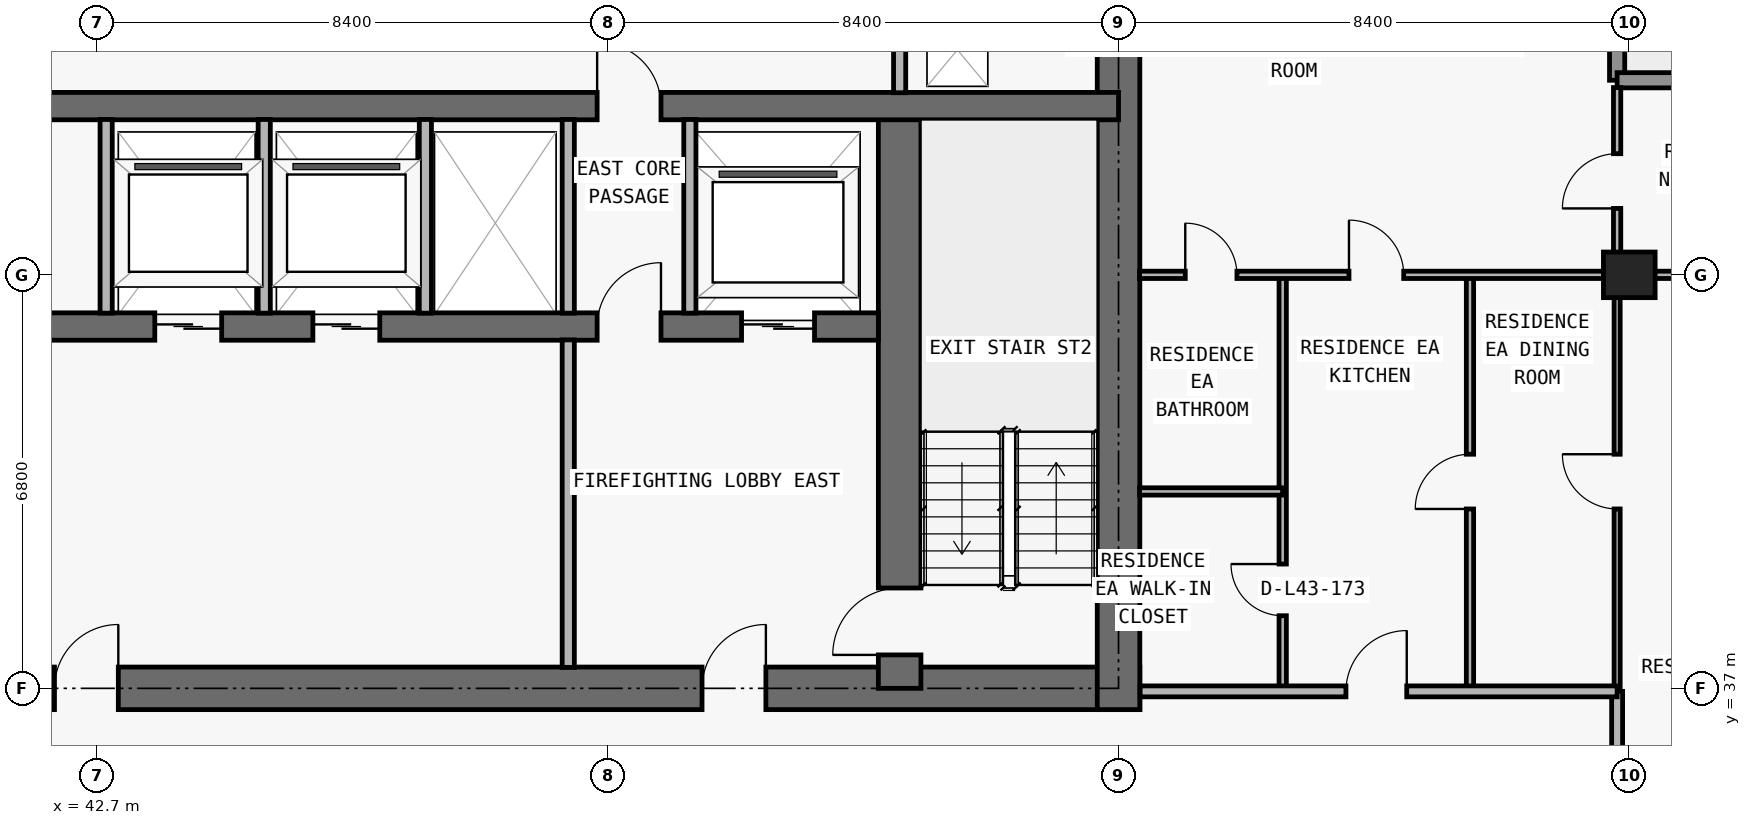
"""IFC4 building model, lengths in metres.
Left out: names, types, materials, properties, quantities, classifications, styles, units other than length and angle.
Written with IfcOpenShell. Run it as: python <this file> out.ifc"""

import sys

from ifc_helpers import new_model, si_unit, direction, frame, frame_2d, origin, origin_2d, place, context, subcontext, project, spatial, rectangle, extrude, element, fill, save


model = new_model("IFC4")
c1 = context("Model", 3, precision=1e-05, world=origin(), true_north=direction((0.0, 1.0)))
c2 = subcontext(c1, "Body", "Model", "MODEL_VIEW")
j1 = project(units=[si_unit("LENGTHUNIT", "METRE"), si_unit("PLANEANGLEUNIT", "RADIAN")], contexts=[c1])
p1 = place(None, origin())
s1 = spatial("IfcSite", under=j1, at=p1, CompositionType="ELEMENT")
p2 = place(p1, origin())
s2 = spatial("IfcBuilding", under=s1, at=p2, CompositionType="ELEMENT")
p3 = place(p2, frame((0.0, 0.0, 157.2)))
s3 = spatial("IfcBuildingStorey", under=s2, at=p3, CompositionType="ELEMENT", Elevation=157.2)
p4 = place(p3, frame((67.9, 43.8, 0.0), z_axis=(0.0, 0.0, 1.0), x_axis=(1.0, 0.0, 0.0)))
e1 = element("IfcColumn", 1, at=p4, inside=s3, PredefinedType="COLUMN", context=c2, shape_type="SweptSolid", body=[
    extrude(rectangle(XDim=0.85, YDim=0.75, at=origin_2d()), origin(), (0.0, 0.0, 1.0), 3.05),
])
p5 = place(p3, frame((17.95, 37.0, 0.0), z_axis=(0.0, 0.0, 1.0), x_axis=(1.0, 0.0, 0.0)))
e2 = element("IfcWall", 2, at=p5, inside=s3, PredefinedType="SHEAR", context=c2, shape_type="SweptSolid", body=[
    extrude(rectangle(XDim=41.9, YDim=0.7, at=frame_2d((20.95, 0.0))), origin(), (0.0, 0.0, 1.0), 3.05),
])
p6 = place(p5, frame((14.35, 0.0, 0.0)))
e3 = element("IfcOpeningElement", 3, at=p6, cuts=e2, PredefinedType="OPENING", context=c2, shape_type="SweptSolid", body=[
    extrude(rectangle(XDim=1.1, YDim=2.15, at=frame_2d((0.55, 1.075))), frame((0.0, 0.36, 0.0), z_axis=(0.0, -1.0, 0.0), x_axis=(1.0, 0.0, 0.0)), (0.0, 0.0, 1.0), 0.72),
])
p7 = place(p5, frame((6.2, 0.0, 0.0)))
e4 = element("IfcOpeningElement", 4, at=p7, cuts=e2, PredefinedType="OPENING", context=c2, shape_type="SweptSolid", body=[
    extrude(rectangle(XDim=1.05, YDim=2.15, at=frame_2d((0.525, 1.075))), frame((0.0, 0.36, 0.0), z_axis=(0.0, -1.0, 0.0), x_axis=(1.0, 0.0, 0.0)), (0.0, 0.0, 1.0), 0.72),
])
p8 = place(p5, frame((34.7, 0.0, 0.0)))
e5 = element("IfcOpeningElement", 5, at=p8, cuts=e2, PredefinedType="OPENING", context=c2, shape_type="SweptSolid", body=[
    extrude(rectangle(XDim=1.05, YDim=2.15, at=frame_2d((0.525, 1.075))), frame((0.0, 0.36, 0.0), z_axis=(0.0, -1.0, 0.0), x_axis=(1.0, 0.0, 0.0)), (0.0, 0.0, 1.0), 0.72),
])
p9 = place(p5, frame((10.812, 0.0, 0.0)))
e6 = element("IfcOpeningElement", 6, at=p9, cuts=e2, PredefinedType="OPENING", context=c2, shape_type="SweptSolid", body=[
    extrude(rectangle(XDim=1.05, YDim=2.15, at=frame_2d((0.525, 1.075))), frame((0.0, 0.36, 0.0), z_axis=(0.0, -1.0, 0.0), x_axis=(1.0, 0.0, 0.0)), (0.0, 0.0, 1.0), 0.72),
])
p10 = place(p5, frame((24.05, 0.0, 0.0)))
e7 = element("IfcOpeningElement", 7, at=p10, cuts=e2, PredefinedType="OPENING", context=c2, shape_type="SweptSolid", body=[
    extrude(rectangle(XDim=1.05, YDim=2.15, at=frame_2d((0.525, 1.075))), frame((0.0, 0.36, 0.0), z_axis=(0.0, -1.0, 0.0), x_axis=(1.0, 0.0, 0.0)), (0.0, 0.0, 1.0), 0.72),
])
p11 = place(p3, frame((59.5, 36.65, 0.0), z_axis=(0.0, 0.0, 1.0), x_axis=(0.0, 1.0, 0.0)))
e8 = element("IfcWall", 8, at=p11, inside=s3, PredefinedType="SHEAR", context=c2, shape_type="SweptSolid", body=[
    extrude(rectangle(XDim=13.95, YDim=0.7, at=frame_2d((6.975, 0.0))), origin(), (0.0, 0.0, 1.0), 3.05),
])
p12 = place(p3, frame((55.9, 37.0, 0.0), z_axis=(0.0, 0.0, 1.0), x_axis=(0.0, 1.0, 0.0)))
e9 = element("IfcWall", 9, at=p12, inside=s3, PredefinedType="SHEAR", context=c2, shape_type="SweptSolid", body=[
    extrude(rectangle(XDim=9.575, YDim=0.7, at=frame_2d((4.788, 0.0))), origin(), (0.0, 0.0, 1.0), 3.05),
])
p13 = place(p12, frame((0.55, 0.0, 0.0)))
e10 = element("IfcOpeningElement", 10, at=p13, cuts=e9, PredefinedType="OPENING", context=c2, shape_type="SweptSolid", body=[
    extrude(rectangle(XDim=1.1, YDim=2.15, at=frame_2d((0.55, 1.075))), frame((0.0, 0.36, 0.0), z_axis=(0.0, -1.0, 0.0), x_axis=(1.0, 0.0, 0.0)), (0.0, 0.0, 1.0), 0.72),
])
p14 = place(p3, frame((22.25, 42.95, 0.0), z_axis=(0.0, 0.0, 1.0), x_axis=(1.0, 0.0, 0.0)))
e11 = element("IfcWall", 11, at=p14, inside=s3, PredefinedType="SHEAR", context=c2, shape_type="SweptSolid", body=[
    extrude(rectangle(XDim=33.3, YDim=0.45, at=frame_2d((16.65, 0.0))), origin(), (0.0, 0.0, 1.0), 3.05),
])
p15 = place(p14, frame((1.05, 0.0, 0.0)))
e12 = element("IfcOpeningElement", 12, at=p15, cuts=e11, PredefinedType="OPENING", context=c2, shape_type="SweptSolid", body=[
    extrude(rectangle(XDim=1.2, YDim=2.2, at=frame_2d((0.6, 1.1))), frame((0.0, 0.235, 0.0), z_axis=(0.0, -1.0, 0.0), x_axis=(1.0, 0.0, 0.0)), (0.0, 0.0, 1.0), 0.47),
])
p16 = place(p14, frame((31.05, 0.0, 0.0)))
e13 = element("IfcOpeningElement", 13, at=p16, cuts=e11, PredefinedType="OPENING", context=c2, shape_type="SweptSolid", body=[
    extrude(rectangle(XDim=1.2, YDim=2.2, at=frame_2d((0.6, 1.1))), frame((0.0, 0.235, 0.0), z_axis=(0.0, -1.0, 0.0), x_axis=(1.0, 0.0, 0.0)), (0.0, 0.0, 1.0), 0.47),
])
p17 = place(p14, frame((21.4, 0.0, 0.0)))
e14 = element("IfcOpeningElement", 14, at=p17, cuts=e11, PredefinedType="OPENING", context=c2, shape_type="SweptSolid", body=[
    extrude(rectangle(XDim=1.1, YDim=2.2, at=frame_2d((0.55, 1.1))), frame((0.0, 0.235, 0.0), z_axis=(0.0, -1.0, 0.0), x_axis=(1.0, 0.0, 0.0)), (0.0, 0.0, 1.0), 0.47),
])
p18 = place(p14, frame((24.0, 0.0, 0.0)))
e15 = element("IfcOpeningElement", 15, at=p18, cuts=e11, PredefinedType="OPENING", context=c2, shape_type="SweptSolid", body=[
    extrude(rectangle(XDim=1.1, YDim=2.2, at=frame_2d((0.55, 1.1))), frame((0.0, 0.235, 0.0), z_axis=(0.0, -1.0, 0.0), x_axis=(1.0, 0.0, 0.0)), (0.0, 0.0, 1.0), 0.47),
])
p19 = place(p14, frame((3.625, 0.0, 0.0)))
e16 = element("IfcOpeningElement", 16, at=p19, cuts=e11, PredefinedType="OPENING", context=c2, shape_type="SweptSolid", body=[
    extrude(rectangle(XDim=1.05, YDim=2.15, at=frame_2d((0.525, 1.075))), frame((0.0, 0.235, 0.0), z_axis=(0.0, -1.0, 0.0), x_axis=(1.0, 0.0, 0.0)), (0.0, 0.0, 1.0), 0.47),
])
p20 = place(p14, frame((28.675, 0.0, 0.0)))
e17 = element("IfcOpeningElement", 17, at=p20, cuts=e11, PredefinedType="OPENING", context=c2, shape_type="SweptSolid", body=[
    extrude(rectangle(XDim=1.05, YDim=2.15, at=frame_2d((0.525, 1.075))), frame((0.0, 0.235, 0.0), z_axis=(0.0, -1.0, 0.0), x_axis=(1.0, 0.0, 0.0)), (0.0, 0.0, 1.0), 0.47),
])
p21 = place(p14, frame((15.975, 0.0, 0.0)))
e18 = element("IfcOpeningElement", 18, at=p21, cuts=e11, PredefinedType="OPENING", context=c2, shape_type="SweptSolid", body=[
    extrude(rectangle(XDim=1.0, YDim=2.2, at=frame_2d((0.5, 1.1))), frame((0.0, 0.235, 0.0), z_axis=(0.0, -1.0, 0.0), x_axis=(1.0, 0.0, 0.0)), (0.0, 0.0, 1.0), 0.47),
])
p22 = place(p3, frame((18.3, 46.575, 0.0), z_axis=(0.0, 0.0, 1.0), x_axis=(1.0, 0.0, 0.0)))
e19 = element("IfcWall", 19, at=p22, inside=s3, PredefinedType="SHEAR", context=c2, shape_type="SweptSolid", body=[
    extrude(rectangle(XDim=41.2, YDim=0.45, at=frame_2d((20.6, 0.0))), origin(), (0.0, 0.0, 1.0), 3.05),
])
p23 = place(p22, frame((7.575, 0.0, 0.0)))
e20 = element("IfcOpeningElement", 20, at=p23, cuts=e19, PredefinedType="OPENING", context=c2, shape_type="SweptSolid", body=[
    extrude(rectangle(XDim=1.05, YDim=2.15, at=frame_2d((0.525, 1.075))), frame((0.0, 0.235, 0.0), z_axis=(0.0, -1.0, 0.0), x_axis=(1.0, 0.0, 0.0)), (0.0, 0.0, 1.0), 0.47),
])
p24 = place(p22, frame((32.625, 0.0, 0.0)))
e21 = element("IfcOpeningElement", 21, at=p24, cuts=e19, PredefinedType="OPENING", context=c2, shape_type="SweptSolid", body=[
    extrude(rectangle(XDim=1.05, YDim=2.15, at=frame_2d((0.525, 1.075))), frame((0.0, 0.235, 0.0), z_axis=(0.0, -1.0, 0.0), x_axis=(1.0, 0.0, 0.0)), (0.0, 0.0, 1.0), 0.47),
])
p25 = place(p3, frame((67.7, 50.45, 0.0), z_axis=(0.0, 0.0, 1.0), x_axis=(0.0, -1.0, 0.0)))
e22 = element("IfcWall", 22, at=p25, inside=s3, PredefinedType="ELEMENTEDWALL", context=c2, shape_type="SweptSolid", body=[
    extrude(rectangle(XDim=3.45, YDim=0.25, at=frame_2d((1.725, 0.0))), origin(), (0.0, 0.0, 1.0), 3.05),
])
p26 = place(p3, frame((67.7, 47.0, 0.0), z_axis=(0.0, 0.0, 1.0), x_axis=(1.0, 0.0, 0.0)))
e23 = element("IfcWall", 23, at=p26, inside=s3, PredefinedType="ELEMENTEDWALL", context=c2, shape_type="SweptSolid", body=[
    extrude(rectangle(XDim=3.85, YDim=0.25, at=frame_2d((1.925, 0.0))), origin(), (0.0, 0.0, 1.0), 3.05),
])
for number, where, z_axis, x_axis in (
    (24, (42.85, 43.17, 0.0), (0.0, 0.0, 1.0), (0.0, 1.0, 0.0)),
    (25, (45.45, 43.17, 0.0), (0.0, 0.0, 1.0), (0.0, 1.0, 0.0)),
    (26, (48.1, 43.17, 0.0), (0.0, 0.0, 1.0), (0.0, 1.0, 0.0)),
):
    element("IfcWall", number, at=place(p3, frame(where, z_axis=z_axis, x_axis=x_axis)), inside=s3, PredefinedType="PARTITIONING", context=c2, shape_type="SweptSolid", body=[
        extrude(rectangle(XDim=3.185, YDim=0.2, at=frame_2d((1.593, 0.0))), origin(), (0.0, 0.0, 1.0), 3.05),
    ])
p27 = place(p3, frame((50.45, 37.345, 0.0), z_axis=(0.0, 0.0, 1.0), x_axis=(0.0, 1.0, 0.0)))
e27 = element("IfcWall", 27, at=p27, inside=s3, PredefinedType="PARTITIONING", context=c2, shape_type="SweptSolid", body=[
    extrude(rectangle(XDim=5.385, YDim=0.2, at=frame_2d((2.692, 0.0))), origin(), (0.0, 0.0, 1.0), 3.05),
])
for number, where, z_axis, x_axis in (
    (28, (50.45, 43.17, 0.0), (0.0, 0.0, 1.0), (0.0, 1.0, 0.0)),
    (29, (52.45, 43.17, 0.0), (0.0, 0.0, 1.0), (0.0, 1.0, 0.0)),
):
    element("IfcWall", number, at=place(p3, frame(where, z_axis=z_axis, x_axis=x_axis)), inside=s3, PredefinedType="PARTITIONING", context=c2, shape_type="SweptSolid", body=[
        extrude(rectangle(XDim=3.185, YDim=0.2, at=frame_2d((1.593, 0.0))), origin(), (0.0, 0.0, 1.0), 3.05),
    ])
p28 = place(p3, frame((55.9, 46.795, 0.0), z_axis=(0.0, 0.0, 1.0), x_axis=(0.0, 1.0, 0.0)))
e30 = element("IfcWall", 30, at=p28, inside=s3, PredefinedType="PARTITIONING", context=c2, shape_type="SweptSolid", body=[
    extrude(rectangle(XDim=3.16, YDim=0.2, at=frame_2d((1.58, 0.0))), origin(), (0.0, 0.0, 1.0), 3.05),
])
p29 = place(p3, frame((62.2, 37.0, 0.0), z_axis=(0.0, 0.0, 1.0), x_axis=(0.0, 1.0, 0.0)))
e31 = element("IfcWall", 31, at=p29, inside=s3, PredefinedType="PARTITIONING", context=c2, shape_type="SweptSolid", body=[
    extrude(rectangle(XDim=6.8, YDim=0.12, at=frame_2d((3.4, 0.0))), origin(), (0.0, 0.0, 1.0), 3.05),
])
p30 = place(p29, frame((1.194, 0.0, 0.0)))
e32 = element("IfcOpeningElement", 32, at=p30, cuts=e31, PredefinedType="OPENING", context=c2, shape_type="SweptSolid", body=[
    extrude(rectangle(XDim=0.85, YDim=2.1, at=frame_2d((0.425, 1.05))), frame((0.0, 0.07, 0.0), z_axis=(0.0, -1.0, 0.0), x_axis=(1.0, 0.0, 0.0)), (0.0, 0.0, 1.0), 0.14),
])
p31 = place(p3, frame((65.28, 37.0, 0.0), z_axis=(0.0, 0.0, 1.0), x_axis=(0.0, 1.0, 0.0)))
e33 = element("IfcWall", 33, at=p31, inside=s3, PredefinedType="PARTITIONING", context=c2, shape_type="SweptSolid", body=[
    extrude(rectangle(XDim=6.8, YDim=0.12, at=frame_2d((3.4, 0.0))), origin(), (0.0, 0.0, 1.0), 3.05),
])
p32 = place(p31, frame((2.95, 0.0, 0.0)))
e34 = element("IfcOpeningElement", 34, at=p32, cuts=e33, PredefinedType="OPENING", context=c2, shape_type="SweptSolid", body=[
    extrude(rectangle(XDim=0.9, YDim=2.15, at=frame_2d((0.45, 1.075))), frame((0.0, 0.07, 0.0), z_axis=(0.0, -1.0, 0.0), x_axis=(1.0, 0.0, 0.0)), (0.0, 0.0, 1.0), 0.14),
])
p33 = place(p3, frame((67.7, 34.205, 0.0), z_axis=(0.0, 0.0, 1.0), x_axis=(0.0, 1.0, 0.0)))
e35 = element("IfcWall", 35, at=p33, inside=s3, PredefinedType="PARTITIONING", context=c2, shape_type="SweptSolid", body=[
    extrude(rectangle(XDim=2.745, YDim=0.18, at=frame_2d((1.373, 0.0))), origin(), (0.0, 0.0, 1.0), 2.263),
])
p34 = place(p3, frame((67.7, 37.0, 0.0), z_axis=(0.0, 0.0, 1.0), x_axis=(0.0, 1.0, 0.0)))
e36 = element("IfcWall", 36, at=p34, inside=s3, PredefinedType="MOVABLE", context=c2, shape_type="SweptSolid", body=[
    extrude(rectangle(XDim=6.8, YDim=0.1, at=frame_2d((3.4, 0.0))), origin(), (0.0, 0.0, 1.0), 2.263),
])
p35 = place(p34, frame((2.95, 0.0, 0.0)))
e37 = element("IfcOpeningElement", 37, at=p35, cuts=e36, PredefinedType="OPENING", context=c2, shape_type="SweptSolid", body=[
    extrude(rectangle(XDim=0.9, YDim=2.15, at=frame_2d((0.45, 1.075))), frame((0.0, 0.06, 0.0), z_axis=(0.0, -1.0, 0.0), x_axis=(1.0, 0.0, 0.0)), (0.0, 0.0, 1.0), 0.12),
])
p36 = place(p3, frame((67.7, 43.805, 0.0), z_axis=(0.0, 0.0, 1.0), x_axis=(0.0, 1.0, 0.0)))
e38 = element("IfcWall", 38, at=p36, inside=s3, PredefinedType="PARTITIONING", context=c2, shape_type="SweptSolid", body=[
    extrude(rectangle(XDim=3.075, YDim=0.12, at=frame_2d((1.538, 0.0))), origin(), (0.0, 0.0, 1.0), 3.05),
])
p37 = place(p36, frame((1.087, 0.0, 0.0)))
e39 = element("IfcOpeningElement", 39, at=p37, cuts=e38, PredefinedType="OPENING", context=c2, shape_type="SweptSolid", body=[
    extrude(rectangle(XDim=0.9, YDim=2.15, at=frame_2d((0.45, 1.075))), frame((0.0, 0.07, 0.0), z_axis=(0.0, -1.0, 0.0), x_axis=(1.0, 0.0, 0.0)), (0.0, 0.0, 1.0), 0.14),
])
p38 = place(p3, frame((59.855, 36.95, 0.0), z_axis=(0.0, 0.0, 1.0), x_axis=(1.0, 0.0, 0.0)))
e40 = element("IfcWall", 40, at=p38, inside=s3, PredefinedType="PARTITIONING", context=c2, shape_type="SweptSolid", body=[
    extrude(rectangle(XDim=7.845, YDim=0.18, at=frame_2d((3.922, 0.0))), origin(), (0.0, 0.0, 1.0), 3.05),
])
p39 = place(p38, frame((3.385, 0.0, 0.0)))
e41 = element("IfcOpeningElement", 41, at=p39, cuts=e40, PredefinedType="OPENING", context=c2, shape_type="SweptSolid", body=[
    extrude(rectangle(XDim=1.0, YDim=2.2, at=frame_2d((0.5, 1.1))), frame((0.0, 0.1, 0.0), z_axis=(0.0, -1.0, 0.0), x_axis=(1.0, 0.0, 0.0)), (0.0, 0.0, 1.0), 0.2),
])
p40 = place(p3, frame((59.845, 40.238, 0.0), z_axis=(0.0, 0.0, 1.0), x_axis=(1.0, 0.0, 0.0)))
e42 = element("IfcWall", 42, at=p40, inside=s3, PredefinedType="PARTITIONING", context=c2, shape_type="SweptSolid", body=[
    extrude(rectangle(XDim=2.355, YDim=0.12, at=frame_2d((1.177, 0.0))), origin(), (0.0, 0.0, 1.0), 3.05),
])
p41 = place(p3, frame((59.845, 43.8, 0.0), z_axis=(0.0, 0.0, 1.0), x_axis=(1.0, 0.0, 0.0)))
e43 = element("IfcWall", 43, at=p41, inside=s3, PredefinedType="PARTITIONING", context=c2, shape_type="SweptSolid", body=[
    extrude(rectangle(XDim=11.56, YDim=0.12, at=frame_2d((5.78, 0.0))), origin(), (0.0, 0.0, 1.0), 2.418),
])
p42 = place(p41, frame((3.445, 0.0, 0.0)))
e44 = element("IfcOpeningElement", 44, at=p42, cuts=e43, PredefinedType="OPENING", context=c2, shape_type="SweptSolid", body=[
    extrude(rectangle(XDim=0.9, YDim=2.15, at=frame_2d((0.45, 1.075))), frame((0.0, 0.07, 0.0), z_axis=(0.0, -1.0, 0.0), x_axis=(1.0, 0.0, 0.0)), (0.0, 0.0, 1.0), 0.14),
])
p43 = place(p41, frame((0.752, 0.0, 0.0)))
e45 = element("IfcOpeningElement", 45, at=p43, cuts=e43, PredefinedType="OPENING", context=c2, shape_type="SweptSolid", body=[
    extrude(rectangle(XDim=0.85, YDim=2.1, at=frame_2d((0.425, 1.05))), frame((0.0, 0.07, 0.0), z_axis=(0.0, -1.0, 0.0), x_axis=(1.0, 0.0, 0.0)), (0.0, 0.0, 1.0), 0.14),
])
p44 = place(p16, origin())
e46 = element("IfcDoor", 46, at=p44, inside=s3, OperationType="DOUBLE_DOOR_SLIDING", PredefinedType="DOOR", context=c2, shape_type="SweptSolid", body=[
    extrude(rectangle(XDim=1.2, YDim=2.2, at=frame_2d((0.6, 1.1))), frame((0.0, 0.025, 0.0), z_axis=(0.0, -1.0, 0.0), x_axis=(1.0, 0.0, 0.0)), (0.0, 0.0, 1.0), 0.05),
])
fill(e13, e46)
p45 = place(p17, origin())
e47 = element("IfcDoor", 47, at=p45, inside=s3, OperationType="DOUBLE_DOOR_SLIDING", PredefinedType="DOOR", context=c2, shape_type="SweptSolid", body=[
    extrude(rectangle(XDim=1.1, YDim=2.2, at=frame_2d((0.55, 1.1))), frame((0.0, 0.025, 0.0), z_axis=(0.0, -1.0, 0.0), x_axis=(1.0, 0.0, 0.0)), (0.0, 0.0, 1.0), 0.05),
])
fill(e14, e47)
p46 = place(p18, origin())
e48 = element("IfcDoor", 48, at=p46, inside=s3, OperationType="DOUBLE_DOOR_SLIDING", PredefinedType="DOOR", context=c2, shape_type="SweptSolid", body=[
    extrude(rectangle(XDim=1.1, YDim=2.2, at=frame_2d((0.55, 1.1))), frame((0.0, 0.025, 0.0), z_axis=(0.0, -1.0, 0.0), x_axis=(1.0, 0.0, 0.0)), (0.0, 0.0, 1.0), 0.05),
])
fill(e15, e48)
p47 = place(p8, origin())
e49 = element("IfcDoor", 49, at=p47, inside=s3, OperationType="SINGLE_SWING_RIGHT", PredefinedType="DOOR", context=c2, shape_type="SweptSolid", body=[
    extrude(rectangle(XDim=1.05, YDim=2.15, at=frame_2d((0.525, 1.075))), frame((0.0, 0.025, 0.0), z_axis=(0.0, -1.0, 0.0), x_axis=(1.0, 0.0, 0.0)), (0.0, 0.0, 1.0), 0.05),
])
fill(e5, e49)
p48 = place(p13, origin())
e50 = element("IfcDoor", 50, at=p48, inside=s3, OperationType="SINGLE_SWING_LEFT", PredefinedType="DOOR", context=c2, shape_type="SweptSolid", body=[
    extrude(rectangle(XDim=1.1, YDim=2.15, at=frame_2d((0.55, 1.075))), frame((0.0, 0.025, 0.0), z_axis=(0.0, -1.0, 0.0), x_axis=(1.0, 0.0, 0.0)), (0.0, 0.0, 1.0), 0.05),
])
fill(e10, e50)
p49 = place(p20, origin())
e51 = element("IfcDoor", 51, at=p49, inside=s3, OperationType="SINGLE_SWING_RIGHT", PredefinedType="DOOR", context=c2, shape_type="SweptSolid", body=[
    extrude(rectangle(XDim=1.05, YDim=2.15, at=frame_2d((0.525, 1.075))), frame((0.0, 0.025, 0.0), z_axis=(0.0, -1.0, 0.0), x_axis=(1.0, 0.0, 0.0)), (0.0, 0.0, 1.0), 0.05),
])
fill(e17, e51)
p50 = place(p10, origin())
e52 = element("IfcDoor", 52, at=p50, inside=s3, OperationType="SINGLE_SWING_RIGHT", PredefinedType="DOOR", context=c2, shape_type="SweptSolid", body=[
    extrude(rectangle(XDim=1.05, YDim=2.15, at=frame_2d((0.525, 1.075))), frame((0.0, 0.025, 0.0), z_axis=(0.0, -1.0, 0.0), x_axis=(1.0, 0.0, 0.0)), (0.0, 0.0, 1.0), 0.05),
])
fill(e7, e52)
p51 = place(p24, origin())
e53 = element("IfcDoor", 53, at=p51, inside=s3, OperationType="SINGLE_SWING_LEFT", PredefinedType="DOOR", context=c2, shape_type="SweptSolid", body=[
    extrude(rectangle(XDim=1.05, YDim=2.15, at=frame_2d((0.525, 1.075))), frame((0.0, 0.025, 0.0), z_axis=(0.0, -1.0, 0.0), x_axis=(1.0, 0.0, 0.0)), (0.0, 0.0, 1.0), 0.05),
])
fill(e21, e53)
p52 = place(p32, origin())
e54 = element("IfcDoor", 54, at=p52, inside=s3, OperationType="SINGLE_SWING_LEFT", PredefinedType="DOOR", context=c2, shape_type="SweptSolid", body=[
    extrude(rectangle(XDim=0.9, YDim=2.15, at=frame_2d((0.45, 1.075))), frame((0.0, 0.025, 0.0), z_axis=(0.0, -1.0, 0.0), x_axis=(1.0, 0.0, 0.0)), (0.0, 0.0, 1.0), 0.05),
])
fill(e34, e54)
p53 = place(p39, origin())
e55 = element("IfcDoor", 55, at=p53, inside=s3, OperationType="SINGLE_SWING_RIGHT", PredefinedType="DOOR", context=c2, shape_type="SweptSolid", body=[
    extrude(rectangle(XDim=1.0, YDim=2.2, at=frame_2d((0.5, 1.1))), frame((0.0, 0.025, 0.0), z_axis=(0.0, -1.0, 0.0), x_axis=(1.0, 0.0, 0.0)), (0.0, 0.0, 1.0), 0.05),
])
fill(e41, e55)
p54 = place(p42, origin())
e56 = element("IfcDoor", 56, at=p54, inside=s3, OperationType="SINGLE_SWING_LEFT", PredefinedType="DOOR", context=c2, shape_type="SweptSolid", body=[
    extrude(rectangle(XDim=0.9, YDim=2.15, at=frame_2d((0.45, 1.075))), frame((0.0, 0.025, 0.0), z_axis=(0.0, -1.0, 0.0), x_axis=(1.0, 0.0, 0.0)), (0.0, 0.0, 1.0), 0.05),
])
fill(e44, e56)
p55 = place(p30, origin())
e57 = element("IfcDoor", 57, at=p55, inside=s3, OperationType="SINGLE_SWING_RIGHT", PredefinedType="DOOR", context=c2, shape_type="SweptSolid", body=[
    extrude(rectangle(XDim=0.85, YDim=2.1, at=frame_2d((0.425, 1.05))), frame((0.0, 0.025, 0.0), z_axis=(0.0, -1.0, 0.0), x_axis=(1.0, 0.0, 0.0)), (0.0, 0.0, 1.0), 0.05),
])
fill(e32, e57)
p56 = place(p43, origin())
e58 = element("IfcDoor", 58, at=p56, inside=s3, OperationType="SINGLE_SWING_LEFT", PredefinedType="DOOR", context=c2, shape_type="SweptSolid", body=[
    extrude(rectangle(XDim=0.85, YDim=2.1, at=frame_2d((0.425, 1.05))), frame((0.0, 0.025, 0.0), z_axis=(0.0, -1.0, 0.0), x_axis=(1.0, 0.0, 0.0)), (0.0, 0.0, 1.0), 0.05),
])
fill(e45, e58)
p57 = place(p35, origin())
e59 = element("IfcDoor", 59, at=p57, inside=s3, OperationType="SINGLE_SWING_RIGHT", PredefinedType="DOOR", context=c2, shape_type="SweptSolid", body=[
    extrude(rectangle(XDim=0.9, YDim=2.15, at=frame_2d((0.45, 1.075))), frame((0.0, 0.025, 0.0), z_axis=(0.0, -1.0, 0.0), x_axis=(1.0, 0.0, 0.0)), (0.0, 0.0, 1.0), 0.05),
])
fill(e37, e59)
p58 = place(p37, origin())
e60 = element("IfcDoor", 60, at=p58, inside=s3, OperationType="SINGLE_SWING_LEFT", PredefinedType="DOOR", context=c2, shape_type="SweptSolid", body=[
    extrude(rectangle(XDim=0.9, YDim=2.15, at=frame_2d((0.45, 1.075))), frame((0.0, 0.025, 0.0), z_axis=(0.0, -1.0, 0.0), x_axis=(1.0, 0.0, 0.0)), (0.0, 0.0, 1.0), 0.05),
])
fill(e39, e60)
save(model, sys.argv[1])
